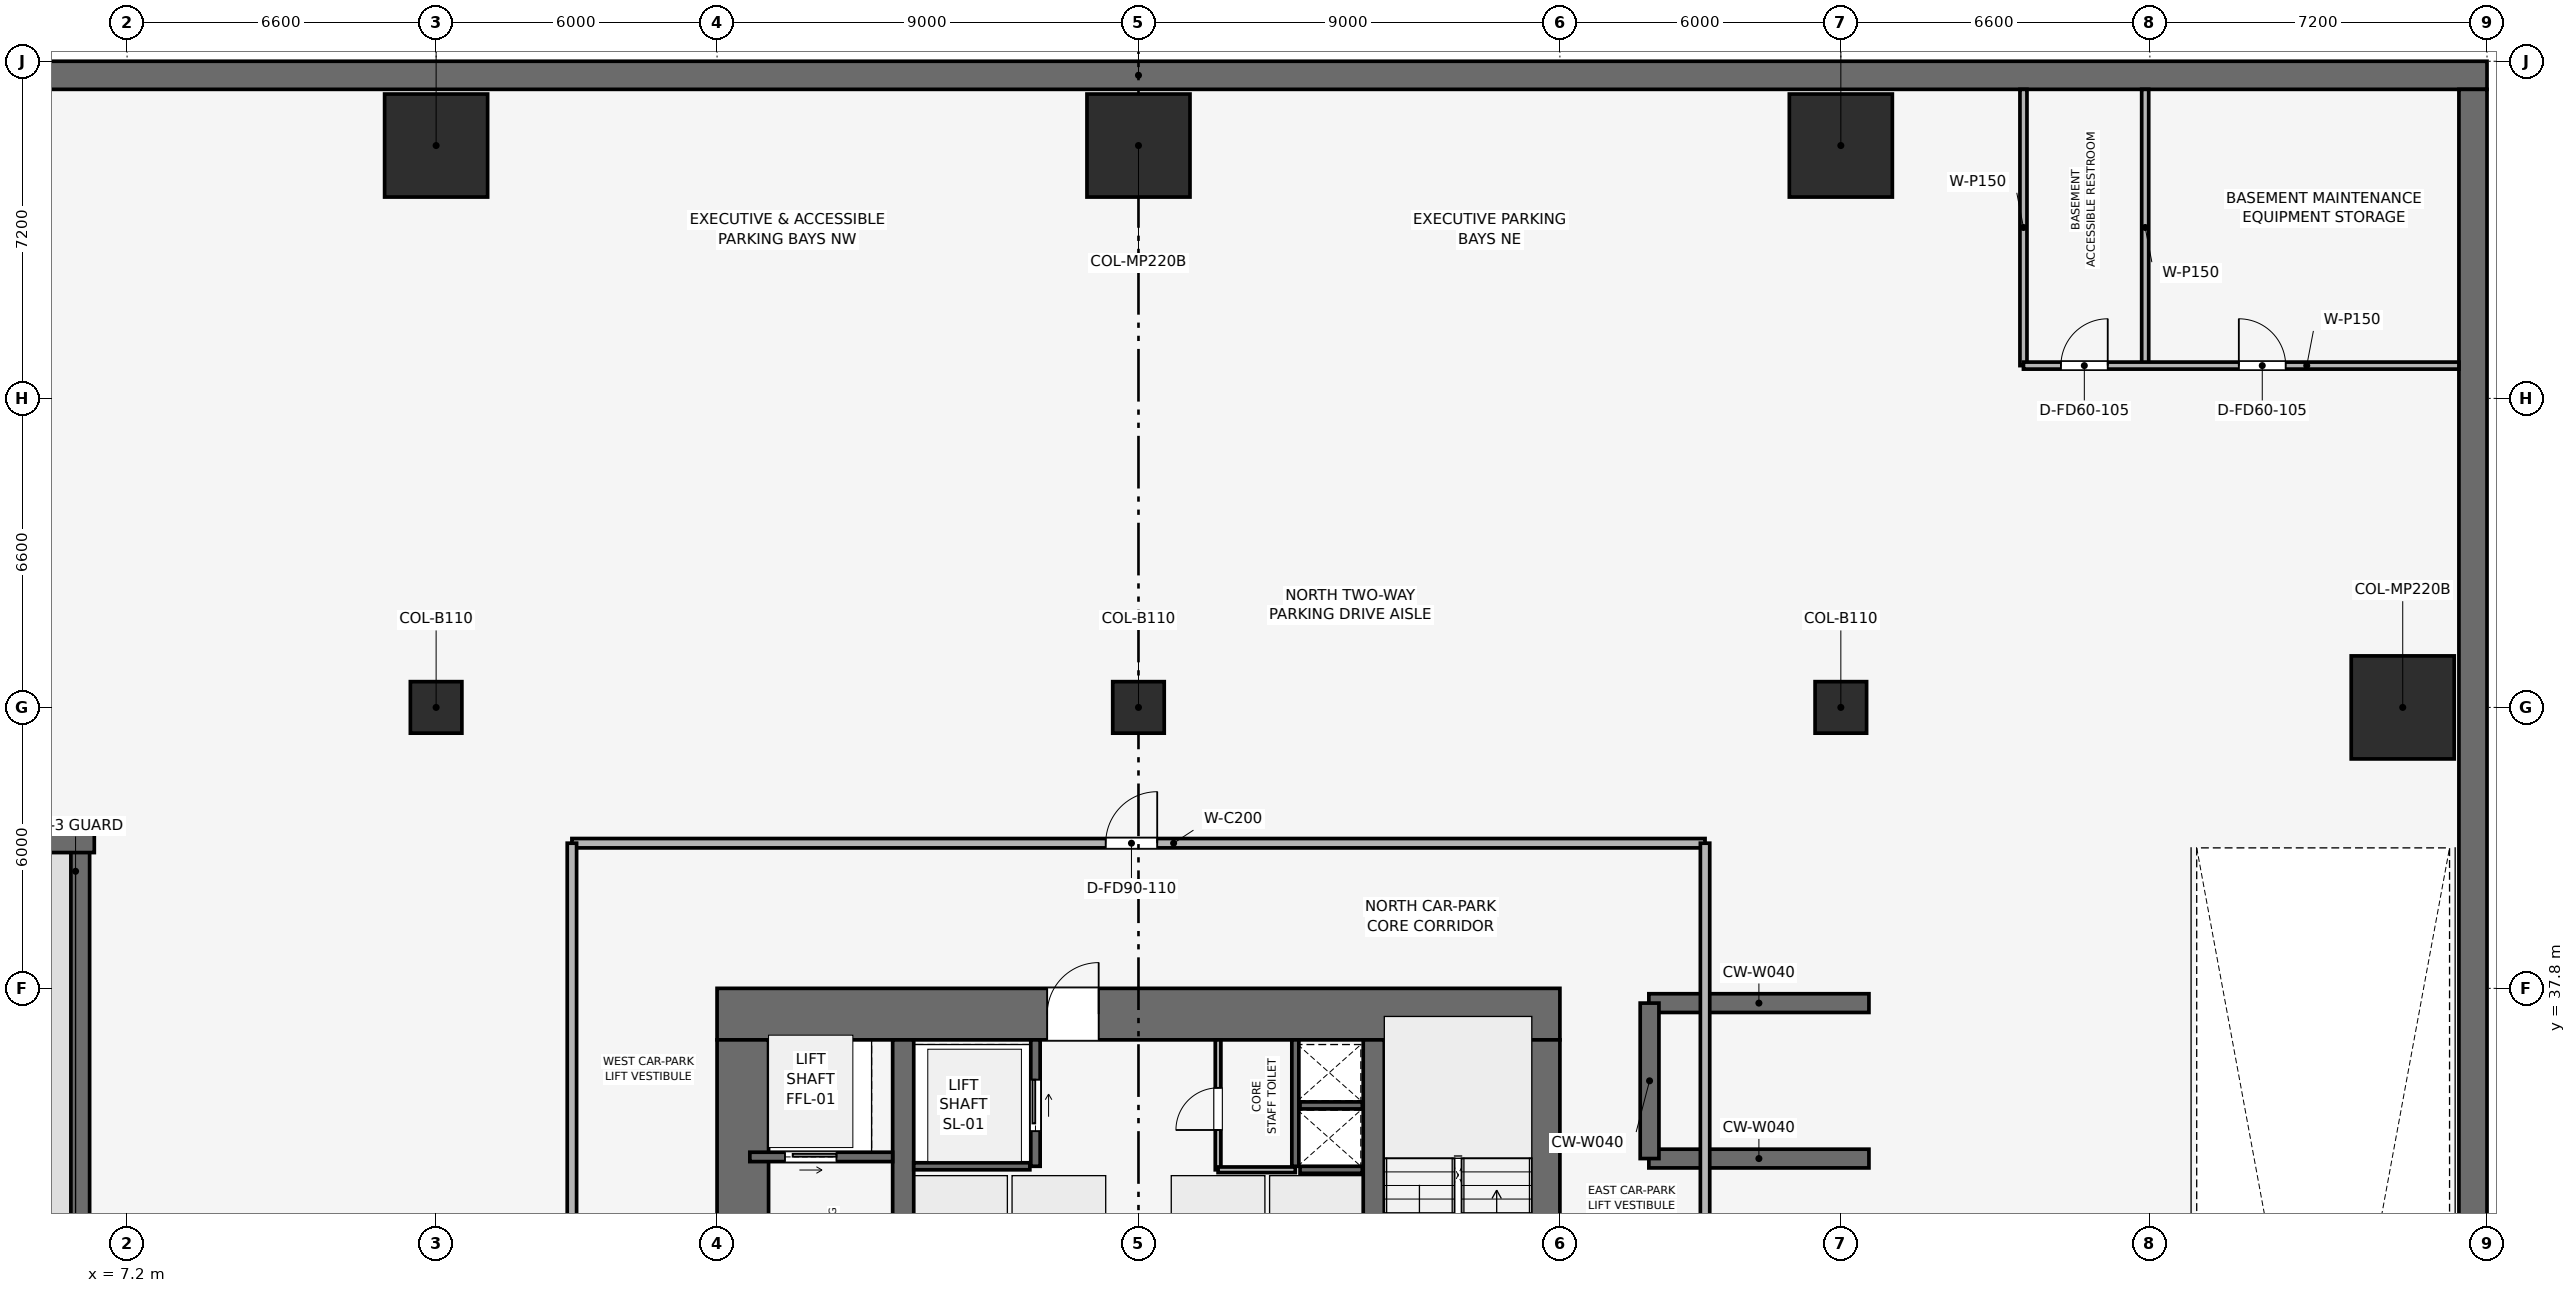
"""IFC4 building model, lengths in metres.
Left out: names, types, materials, properties, quantities, classifications, styles, units other than length and angle.
Written with IfcOpenShell. Run it as: python <this file> out.ifc"""

import sys

from ifc_helpers import new_model, si_unit, direction, frame, frame_2d, origin, origin_2d, place, context, subcontext, project, spatial, rectangle, extrude, element, fill, save


model = new_model("IFC4")
c1 = context("Model", 3, precision=1e-05, world=origin(), true_north=direction((0.0, 1.0)))
c2 = subcontext(c1, "Body", "Model", "MODEL_VIEW")
j1 = project(units=[si_unit("LENGTHUNIT", "METRE"), si_unit("PLANEANGLEUNIT", "RADIAN")], contexts=[c1])
p1 = place(None, origin())
s1 = spatial("IfcSite", under=j1, at=p1, CompositionType="ELEMENT")
p2 = place(p1, origin())
s2 = spatial("IfcBuilding", under=s1, at=p2, CompositionType="ELEMENT")
p3 = place(p2, frame((0.0, 0.0, -4.8)))
s3 = spatial("IfcBuildingStorey", under=s2, at=p3, CompositionType="ELEMENT", Elevation=-4.8)
p4 = place(p3, frame((0.0, 57.3, 0.0), z_axis=(0.0, 0.0, 1.0), x_axis=(1.0, 0.0, 0.0)))
e1 = element("IfcWall", 1, at=p4, inside=s3, PredefinedType="SOLIDWALL", context=c2, shape_type="SweptSolid", body=[
    extrude(rectangle(XDim=57.6, YDim=0.6, at=frame_2d((28.8, 0.0))), origin(), (0.0, 0.0, 1.0), 4.8),
])
p5 = place(p3, frame((57.3, 0.6, 0.0), z_axis=(0.0, 0.0, 1.0), x_axis=(0.0, 1.0, 0.0)))
e2 = element("IfcWall", 2, at=p5, inside=s3, PredefinedType="SOLIDWALL", context=c2, shape_type="SweptSolid", body=[
    extrude(rectangle(XDim=56.4, YDim=0.6, at=frame_2d((28.2, 0.0))), origin(), (0.0, 0.0, 1.0), 4.8),
])
p6 = place(p3, frame((19.8, 37.25, 0.0), z_axis=(0.0, 0.0, 1.0), x_axis=(1.0, 0.0, 0.0)))
e3 = element("IfcWall", 3, at=p6, inside=s3, PredefinedType="SHEAR", context=c2, shape_type="SweptSolid", body=[
    extrude(rectangle(XDim=18.0, YDim=1.1, at=frame_2d((9.0, 0.0))), origin(), (0.0, 0.0, 1.0), 4.8),
])
p7 = place(p6, frame((7.05, 0.0, 0.0)))
e4 = element("IfcOpeningElement", 4, at=p7, cuts=e3, PredefinedType="OPENING", context=c2, shape_type="SweptSolid", body=[
    extrude(rectangle(XDim=1.1, YDim=2.15, at=frame_2d((0.55, 1.075))), frame((0.0, 0.56, 0.0), z_axis=(0.0, -1.0, 0.0), x_axis=(1.0, 0.0, 0.0)), (0.0, 0.0, 1.0), 1.12),
])
p8 = place(p3, frame((20.35, 20.9, 0.0), z_axis=(0.0, 0.0, 1.0), x_axis=(0.0, 1.0, 0.0)))
e5 = element("IfcWall", 5, at=p8, inside=s3, PredefinedType="SHEAR", context=c2, shape_type="SweptSolid", body=[
    extrude(rectangle(XDim=15.8, YDim=1.1, at=frame_2d((7.9, 0.0))), origin(), (0.0, 0.0, 1.0), 4.8),
])
p9 = place(p8, frame((9.9, 0.0, 0.0)))
e6 = element("IfcOpeningElement", 6, at=p9, cuts=e5, PredefinedType="OPENING", context=c2, shape_type="SweptSolid", body=[
    extrude(rectangle(XDim=1.1, YDim=2.15, at=frame_2d((0.55, 1.075))), frame((0.0, 0.56, 0.0), z_axis=(0.0, -1.0, 0.0), x_axis=(1.0, 0.0, 0.0)), (0.0, 0.0, 1.0), 1.12),
])
p10 = place(p3, frame((37.25, 20.9, 0.0), z_axis=(0.0, 0.0, 1.0), x_axis=(0.0, 1.0, 0.0)))
e7 = element("IfcWall", 7, at=p10, inside=s3, PredefinedType="SHEAR", context=c2, shape_type="SweptSolid", body=[
    extrude(rectangle(XDim=15.8, YDim=1.1, at=frame_2d((7.9, 0.0))), origin(), (0.0, 0.0, 1.0), 4.8),
])
p11 = place(p10, frame((4.4, 0.0, 0.0)))
e8 = element("IfcOpeningElement", 8, at=p11, cuts=e7, PredefinedType="OPENING", context=c2, shape_type="SweptSolid", body=[
    extrude(rectangle(XDim=1.1, YDim=2.15, at=frame_2d((0.55, 1.075))), frame((0.0, 0.56, 0.0), z_axis=(0.0, -1.0, 0.0), x_axis=(1.0, 0.0, 0.0)), (0.0, 0.0, 1.0), 1.12),
])
for number, where, z_axis, x_axis in (
    (9, (23.775, 20.9, 0.0), (0.0, 0.0, 1.0), (0.0, 1.0, 0.0)),
    (10, (33.825, 20.9, 0.0), (0.0, 0.0, 1.0), (0.0, 1.0, 0.0)),
):
    element("IfcWall", number, at=place(p3, frame(where, z_axis=z_axis, x_axis=x_axis)), inside=s3, PredefinedType="SHEAR", context=c2, shape_type="SweptSolid", body=[
        extrude(rectangle(XDim=15.8, YDim=0.45, at=frame_2d((7.9, 0.0))), origin(), (0.0, 0.0, 1.0), 4.8),
    ])
for number, where, z_axis, x_axis in (
    (11, (55.8, 43.8, 0.002), (0.0, 0.0, 1.0), (1.0, 0.0, 0.0)),
    (12, (43.8, 55.8, 0.002), (0.0, 0.0, 1.0), (1.0, 0.0, 0.0)),
    (13, (28.8, 55.8, 0.002), (0.0, 0.0, 1.0), (1.0, 0.0, 0.0)),
    (14, (13.8, 55.8, 0.002), (0.0, 0.0, 1.0), (1.0, 0.0, 0.0)),
):
    element("IfcColumn", number, at=place(p3, frame(where, z_axis=z_axis, x_axis=x_axis)), inside=s3, PredefinedType="COLUMN", context=c2, shape_type="SweptSolid", body=[
        extrude(rectangle(XDim=2.2, YDim=2.2, at=origin_2d()), origin(), (0.0, 0.0, 1.0), 4.796),
    ])
for number, where, z_axis, x_axis in (
    (15, (13.8, 43.8, 0.002), (0.0, 0.0, 1.0), (1.0, 0.0, 0.0)),
    (16, (28.8, 43.8, 0.002), (0.0, 0.0, 1.0), (1.0, 0.0, 0.0)),
    (17, (43.8, 43.8, 0.002), (0.0, 0.0, 1.0), (1.0, 0.0, 0.0)),
):
    element("IfcColumn", number, at=place(p3, frame(where, z_axis=z_axis, x_axis=x_axis)), inside=s3, PredefinedType="COLUMN", context=c2, shape_type="SweptSolid", body=[
        extrude(rectangle(XDim=1.1, YDim=1.1, at=origin_2d()), origin(), (0.0, 0.0, 1.0), 4.796),
    ])
p12 = place(p3, frame((6.2, 11.6, 0.0), z_axis=(0.0, 0.0, 1.0), x_axis=(0.0, 1.0, 0.0)))
e18 = element("IfcWall", 18, at=p12, inside=s3, PredefinedType="SHEAR", context=c2, shape_type="SweptSolid", body=[
    extrude(rectangle(XDim=29.4, YDim=0.4, at=frame_2d((14.7, 0.0))), origin(), (0.0, 0.0, 1.0), 4.78),
])
p13 = place(p3, frame((0.5, 40.9, 0.0), z_axis=(0.0, 0.0, 1.0), x_axis=(1.0, 0.0, 0.0)))
e19 = element("IfcWall", 19, at=p13, inside=s3, PredefinedType="SHEAR", context=c2, shape_type="SweptSolid", body=[
    extrude(rectangle(XDim=6.0, YDim=0.4, at=frame_2d((3.0, 0.0))), origin(), (0.0, 0.0, 1.0), 4.78),
])
for number, where, z_axis, x_axis in (
    (20, (39.7, 34.165, 0.002), (0.0, 0.0, 1.0), (1.0, 0.0, 0.0)),
    (21, (39.7, 37.485, 0.002), (0.0, 0.0, 1.0), (1.0, 0.0, 0.0)),
):
    element("IfcWall", number, at=place(p3, frame(where, z_axis=z_axis, x_axis=x_axis)), inside=s3, PredefinedType="SHEAR", context=c2, shape_type="SweptSolid", body=[
        extrude(rectangle(XDim=4.7, YDim=0.4, at=frame_2d((2.35, 0.0))), origin(), (0.0, 0.0, 1.0), 4.396),
    ])
p14 = place(p3, frame((39.715, 34.165, 0.002), z_axis=(0.0, 0.0, 1.0), x_axis=(0.0, 1.0, 0.0)))
e22 = element("IfcWall", 22, at=p14, inside=s3, PredefinedType="SHEAR", context=c2, shape_type="SweptSolid", body=[
    extrude(rectangle(XDim=3.32, YDim=0.4, at=frame_2d((1.66, 0.0))), origin(), (0.0, 0.0, 1.0), 4.396),
])
p15 = place(p3, frame((32.15, 34.0, 0.0), z_axis=(0.0, 0.0, 1.0), x_axis=(0.0, 1.0, 0.0)))
e23 = element("IfcWall", 23, at=p15, inside=s3, PredefinedType="SHEAR", context=c2, shape_type="SweptSolid", body=[
    extrude(rectangle(XDim=2.7, YDim=0.15, at=frame_2d((1.35, 0.0))), origin(), (0.0, 0.0, 1.0), 4.4),
])
for number, where, z_axis, x_axis in (
    (24, (32.25, 33.925, 0.0), (0.0, 0.0, 1.0), (1.0, 0.0, 0.0)),
    (25, (32.25, 35.3, 0.0), (0.0, 0.0, 1.0), (1.0, 0.0, 0.0)),
):
    element("IfcWall", number, at=place(p3, frame(where, z_axis=z_axis, x_axis=x_axis)), inside=s3, PredefinedType="SHEAR", context=c2, shape_type="SweptSolid", body=[
        extrude(rectangle(XDim=1.33, YDim=0.15, at=frame_2d((0.665, 0.0))), origin(), (0.0, 0.0, 1.0), 4.4),
    ])
p16 = place(p3, frame((20.5, 34.2, 0.0), z_axis=(0.0, 0.0, 1.0), x_axis=(1.0, 0.0, 0.0)))
e26 = element("IfcWall", 26, at=p16, inside=s3, PredefinedType="SHEAR", context=c2, shape_type="SweptSolid", body=[
    extrude(rectangle(XDim=3.05, YDim=0.2, at=frame_2d((1.525, 0.0))), origin(), (0.0, 0.0, 1.0), 4.4),
])
p17 = place(p16, frame((0.75, 0.0, 0.0)))
e27 = element("IfcOpeningElement", 27, at=p17, cuts=e26, PredefinedType="OPENING", context=c2, shape_type="SweptSolid", body=[
    extrude(rectangle(XDim=1.1, YDim=2.15, at=frame_2d((0.55, 1.075))), frame((0.0, 0.11, 0.0), z_axis=(0.0, -1.0, 0.0), x_axis=(1.0, 0.0, 0.0)), (0.0, 0.0, 1.0), 0.22),
])
p18 = place(p3, frame((26.6, 34.0, 0.0), z_axis=(0.0, 0.0, 1.0), x_axis=(0.0, 1.0, 0.0)))
e28 = element("IfcWall", 28, at=p18, inside=s3, PredefinedType="SHEAR", context=c2, shape_type="SweptSolid", body=[
    extrude(rectangle(XDim=2.7, YDim=0.2, at=frame_2d((1.35, 0.0))), origin(), (0.0, 0.0, 1.0), 4.4),
])
p19 = place(p18, frame((0.75, 0.0, 0.0)))
e29 = element("IfcOpeningElement", 29, at=p19, cuts=e28, PredefinedType="OPENING", context=c2, shape_type="SweptSolid", body=[
    extrude(rectangle(XDim=1.1, YDim=2.15, at=frame_2d((0.55, 1.075))), frame((0.0, 0.11, 0.0), z_axis=(0.0, -1.0, 0.0), x_axis=(1.0, 0.0, 0.0)), (0.0, 0.0, 1.0), 0.22),
])
p20 = place(p3, frame((24.0, 34.0, 0.0), z_axis=(0.0, 0.0, 1.0), x_axis=(1.0, 0.0, 0.0)))
e30 = element("IfcWall", 30, at=p20, inside=s3, PredefinedType="SHEAR", context=c2, shape_type="SweptSolid", body=[
    extrude(rectangle(XDim=2.48, YDim=0.15, at=frame_2d((1.24, 0.0))), origin(), (0.0, 0.0, 1.0), 4.4),
])
p21 = place(p3, frame((30.5, 33.925, 0.0), z_axis=(0.0, 0.0, 1.0), x_axis=(0.0, 1.0, 0.0)))
e31 = element("IfcWall", 31, at=p21, inside=s3, PredefinedType="PARTITIONING", context=c2, shape_type="SweptSolid", body=[
    extrude(rectangle(XDim=2.775, YDim=0.12, at=frame_2d((1.387, 0.0))), origin(), (0.0, 0.0, 1.0), 4.4),
])
p22 = place(p21, frame((0.85, 0.0, 0.0)))
e32 = element("IfcOpeningElement", 32, at=p22, cuts=e31, PredefinedType="OPENING", context=c2, shape_type="SweptSolid", body=[
    extrude(rectangle(XDim=0.9, YDim=2.1, at=frame_2d((0.45, 1.05))), frame((0.0, 0.07, 0.0), z_axis=(0.0, -1.0, 0.0), x_axis=(1.0, 0.0, 0.0)), (0.0, 0.0, 1.0), 0.14),
])
p23 = place(p3, frame((30.5, 33.925, 0.0), z_axis=(0.0, 0.0, 1.0), x_axis=(1.0, 0.0, 0.0)))
e33 = element("IfcWall", 33, at=p23, inside=s3, PredefinedType="PARTITIONING", context=c2, shape_type="SweptSolid", body=[
    extrude(rectangle(XDim=1.65, YDim=0.12, at=frame_2d((0.825, 0.0))), origin(), (0.0, 0.0, 1.0), 4.4),
])
p24 = place(p3, frame((16.7, 40.9, 0.0), z_axis=(0.0, 0.0, 1.0), x_axis=(1.0, 0.0, 0.0)))
e34 = element("IfcWall", 34, at=p24, inside=s3, PredefinedType="PARTITIONING", context=c2, shape_type="SweptSolid", body=[
    extrude(rectangle(XDim=24.2, YDim=0.2, at=frame_2d((12.1, 0.0))), origin(), (0.0, 0.0, 1.0), 2.985),
])
p25 = place(p24, frame((11.4, 0.0, 0.0)))
e35 = element("IfcOpeningElement", 35, at=p25, cuts=e34, PredefinedType="OPENING", context=c2, shape_type="SweptSolid", body=[
    extrude(rectangle(XDim=1.1, YDim=2.15, at=frame_2d((0.55, 1.075))), frame((0.0, 0.11, 0.0), z_axis=(0.0, -1.0, 0.0), x_axis=(1.0, 0.0, 0.0)), (0.0, 0.0, 1.0), 0.22),
])
p26 = place(p3, frame((16.7, 16.7, 0.0), z_axis=(0.0, 0.0, 1.0), x_axis=(0.0, 1.0, 0.0)))
e36 = element("IfcWall", 36, at=p26, inside=s3, PredefinedType="PARTITIONING", context=c2, shape_type="SweptSolid", body=[
    extrude(rectangle(XDim=24.2, YDim=0.2, at=frame_2d((12.1, 0.0))), origin(), (0.0, 0.0, 1.0), 2.985),
])
p27 = place(p26, frame((11.4, 0.0, 0.0)))
e37 = element("IfcOpeningElement", 37, at=p27, cuts=e36, PredefinedType="OPENING", context=c2, shape_type="SweptSolid", body=[
    extrude(rectangle(XDim=1.1, YDim=2.15, at=frame_2d((0.55, 1.075))), frame((0.0, 0.11, 0.0), z_axis=(0.0, -1.0, 0.0), x_axis=(1.0, 0.0, 0.0)), (0.0, 0.0, 1.0), 0.22),
])
p28 = place(p3, frame((40.9, 16.7, 0.0), z_axis=(0.0, 0.0, 1.0), x_axis=(0.0, 1.0, 0.0)))
e38 = element("IfcWall", 38, at=p28, inside=s3, PredefinedType="PARTITIONING", context=c2, shape_type="SweptSolid", body=[
    extrude(rectangle(XDim=24.2, YDim=0.2, at=frame_2d((12.1, 0.0))), origin(), (0.0, 0.0, 1.0), 2.985),
])
p29 = place(p28, frame((11.4, 0.0, 0.0)))
e39 = element("IfcOpeningElement", 39, at=p29, cuts=e38, PredefinedType="OPENING", context=c2, shape_type="SweptSolid", body=[
    extrude(rectangle(XDim=1.1, YDim=2.15, at=frame_2d((0.55, 1.075))), frame((0.0, 0.11, 0.0), z_axis=(0.0, -1.0, 0.0), x_axis=(1.0, 0.0, 0.0)), (0.0, 0.0, 1.0), 0.22),
])
for number, where, z_axis, x_axis in (
    (40, (47.7, 51.1, 0.0), (0.0, 0.0, 1.0), (0.0, 1.0, 0.0)),
    (41, (50.3, 51.1, 0.0), (0.0, 0.0, 1.0), (0.0, 1.0, 0.0)),
):
    element("IfcWall", number, at=place(p3, frame(where, z_axis=z_axis, x_axis=x_axis)), inside=s3, PredefinedType="PARTITIONING", context=c2, shape_type="SweptSolid", body=[
        extrude(rectangle(XDim=5.9, YDim=0.15, at=frame_2d((2.95, 0.0))), origin(), (0.0, 0.0, 1.0), 4.4),
    ])
p30 = place(p3, frame((47.7, 51.1, 0.0), z_axis=(0.0, 0.0, 1.0), x_axis=(1.0, 0.0, 0.0)))
e42 = element("IfcWall", 42, at=p30, inside=s3, PredefinedType="PARTITIONING", context=c2, shape_type="SweptSolid", body=[
    extrude(rectangle(XDim=9.3, YDim=0.15, at=frame_2d((4.65, 0.0))), origin(), (0.0, 0.0, 1.0), 4.4),
])
p31 = place(p30, frame((0.8, 0.0, 0.0)))
e43 = element("IfcOpeningElement", 43, at=p31, cuts=e42, PredefinedType="OPENING", context=c2, shape_type="SweptSolid", body=[
    extrude(rectangle(XDim=1.0, YDim=2.15, at=frame_2d((0.5, 1.075))), frame((0.0, 0.085, 0.0), z_axis=(0.0, -1.0, 0.0), x_axis=(1.0, 0.0, 0.0)), (0.0, 0.0, 1.0), 0.17),
])
p32 = place(p30, frame((4.6, 0.0, 0.0)))
e44 = element("IfcOpeningElement", 44, at=p32, cuts=e42, PredefinedType="OPENING", context=c2, shape_type="SweptSolid", body=[
    extrude(rectangle(XDim=1.0, YDim=2.15, at=frame_2d((0.5, 1.075))), frame((0.0, 0.085, 0.0), z_axis=(0.0, -1.0, 0.0), x_axis=(1.0, 0.0, 0.0)), (0.0, 0.0, 1.0), 0.17),
])
p33 = place(p17, origin())
e45 = element("IfcDoor", 45, at=p33, inside=s3, OperationType="SLIDING_TO_RIGHT", PredefinedType="DOOR", context=c2, shape_type="SweptSolid", body=[
    extrude(rectangle(XDim=1.1, YDim=2.15, at=frame_2d((0.55, 1.075))), frame((0.0, 0.025, 0.0), z_axis=(0.0, -1.0, 0.0), x_axis=(1.0, 0.0, 0.0)), (0.0, 0.0, 1.0), 0.05),
])
fill(e27, e45)
p34 = place(p19, origin())
e46 = element("IfcDoor", 46, at=p34, inside=s3, OperationType="SLIDING_TO_RIGHT", PredefinedType="DOOR", context=c2, shape_type="SweptSolid", body=[
    extrude(rectangle(XDim=1.1, YDim=2.15, at=frame_2d((0.55, 1.075))), frame((0.0, 0.025, 0.0), z_axis=(0.0, -1.0, 0.0), x_axis=(1.0, 0.0, 0.0)), (0.0, 0.0, 1.0), 0.05),
])
fill(e29, e46)
p35 = place(p22, origin())
e47 = element("IfcDoor", 47, at=p35, inside=s3, OperationType="SINGLE_SWING_LEFT", PredefinedType="DOOR", context=c2, shape_type="SweptSolid", body=[
    extrude(rectangle(XDim=0.9, YDim=2.1, at=frame_2d((0.45, 1.05))), frame((0.0, 0.025, 0.0), z_axis=(0.0, -1.0, 0.0), x_axis=(1.0, 0.0, 0.0)), (0.0, 0.0, 1.0), 0.05),
])
fill(e32, e47)
p36 = place(p25, origin())
e48 = element("IfcDoor", 48, at=p36, inside=s3, OperationType="SINGLE_SWING_RIGHT", PredefinedType="DOOR", context=c2, shape_type="SweptSolid", body=[
    extrude(rectangle(XDim=1.1, YDim=2.15, at=frame_2d((0.55, 1.075))), frame((0.0, 0.025, 0.0), z_axis=(0.0, -1.0, 0.0), x_axis=(1.0, 0.0, 0.0)), (0.0, 0.0, 1.0), 0.05),
])
fill(e35, e48)
p37 = place(p31, origin())
e49 = element("IfcDoor", 49, at=p37, inside=s3, OperationType="SINGLE_SWING_RIGHT", PredefinedType="DOOR", context=c2, shape_type="SweptSolid", body=[
    extrude(rectangle(XDim=1.0, YDim=2.15, at=frame_2d((0.5, 1.075))), frame((0.0, 0.025, 0.0), z_axis=(0.0, -1.0, 0.0), x_axis=(1.0, 0.0, 0.0)), (0.0, 0.0, 1.0), 0.05),
])
fill(e43, e49)
p38 = place(p32, origin())
e50 = element("IfcDoor", 50, at=p38, inside=s3, OperationType="SINGLE_SWING_LEFT", PredefinedType="DOOR", context=c2, shape_type="SweptSolid", body=[
    extrude(rectangle(XDim=1.0, YDim=2.15, at=frame_2d((0.5, 1.075))), frame((0.0, 0.025, 0.0), z_axis=(0.0, -1.0, 0.0), x_axis=(1.0, 0.0, 0.0)), (0.0, 0.0, 1.0), 0.05),
])
fill(e44, e50)
p39 = place(p7, origin())
e51 = element("IfcDoor", 51, at=p39, inside=s3, OperationType="SINGLE_SWING_RIGHT", PredefinedType="DOOR", context=c2, shape_type="SweptSolid", body=[
    extrude(rectangle(XDim=1.1, YDim=2.15, at=frame_2d((0.55, 1.075))), frame((0.0, 0.025, 0.0), z_axis=(0.0, -1.0, 0.0), x_axis=(1.0, 0.0, 0.0)), (0.0, 0.0, 1.0), 0.05),
])
fill(e4, e51)
save(model, sys.argv[1])
